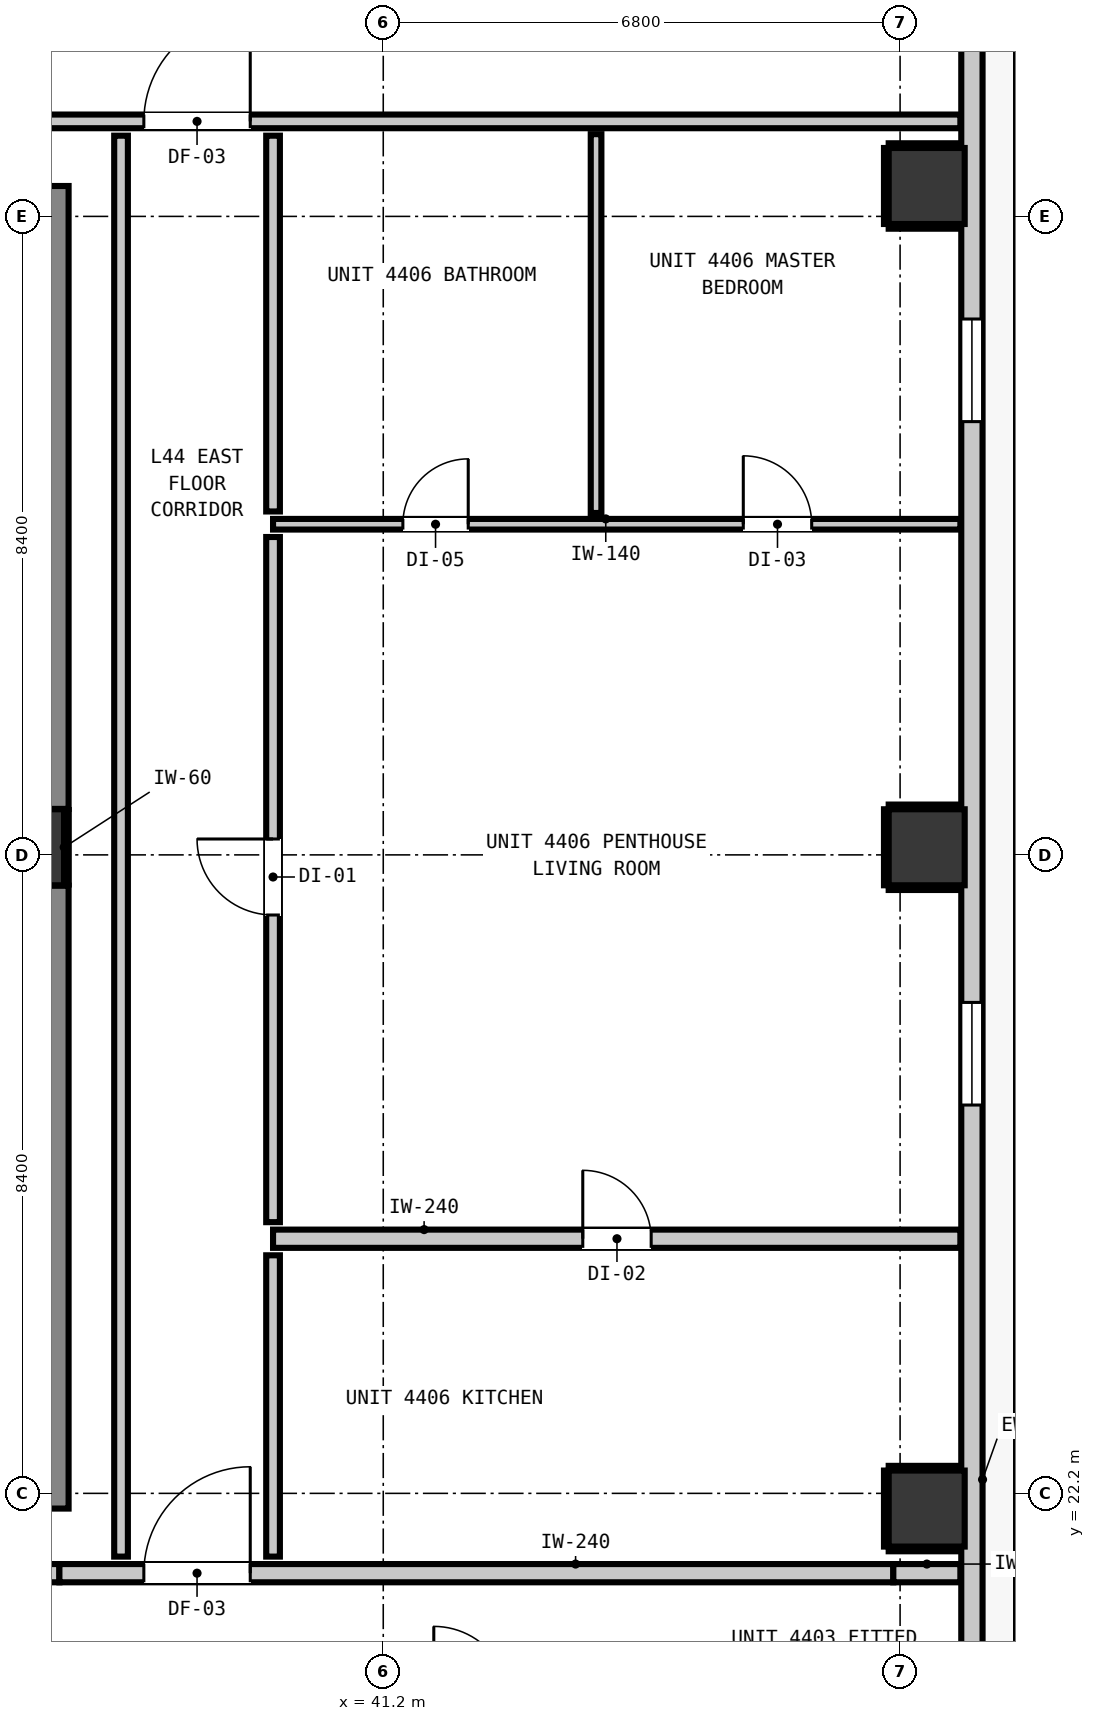
"""IFC4 building model, lengths in metres.
Left out: names, types, materials, properties, quantities, classifications, styles, units other than length and angle.
Written with IfcOpenShell. Run it as: python <this file> out.ifc"""

import sys

from ifc_helpers import new_model, si_unit, direction, frame, frame_2d, origin, origin_2d, place, context, subcontext, project, spatial, rectangle, extrude, element, fill, save


model = new_model("IFC4")
c1 = context("Model", 3, precision=1e-05, world=origin(), true_north=direction((0.0, 1.0)))
c2 = subcontext(c1, "Body", "Model", "MODEL_VIEW")
j1 = project(units=[si_unit("LENGTHUNIT", "METRE"), si_unit("PLANEANGLEUNIT", "RADIAN")], contexts=[c1])
p1 = place(None, origin())
s1 = spatial("IfcSite", under=j1, at=p1, CompositionType="ELEMENT")
p2 = place(p1, origin())
s2 = spatial("IfcBuilding", under=s1, at=p2, CompositionType="ELEMENT")
p3 = place(p2, frame((0.0, 0.0, 152.56)))
s3 = spatial("IfcBuildingStorey", under=s2, at=p3, CompositionType="ELEMENT", Elevation=152.56)
p4 = place(p3, frame((36.5, 30.7, 0.0), z_axis=(0.0, 0.0, 1.0), x_axis=(1.0, 0.0, 0.0)))
e1 = element("IfcColumn", 1, at=p4, inside=s3, PredefinedType="COLUMN", context=c2, shape_type="SweptSolid", body=[
    extrude(rectangle(XDim=1.0, YDim=1.0, at=origin_2d()), origin(), (0.0, 0.0, 1.0), 3.32),
])
p5 = place(p3, frame((36.56, 22.0, 0.0), z_axis=(0.0, 0.0, 1.0), x_axis=(0.0, 1.0, 0.0)))
e2 = element("IfcWall", 2, at=p5, inside=s3, PredefinedType="SHEAR", context=c2, shape_type="SweptSolid", body=[
    extrude(rectangle(XDim=8.195, YDim=1.0, at=frame_2d((4.098, 0.0))), origin(), (0.0, 0.0, 1.0), 3.32),
])
p6 = place(p3, frame((36.56, 31.205, 0.0), z_axis=(0.0, 0.0, 1.0), x_axis=(0.0, 1.0, 0.0)))
e3 = element("IfcWall", 3, at=p6, inside=s3, PredefinedType="SHEAR", context=c2, shape_type="SweptSolid", body=[
    extrude(rectangle(XDim=8.195, YDim=1.0, at=frame_2d((4.097, 0.0))), origin(), (0.0, 0.0, 1.0), 3.32),
])
for number, where, z_axis, x_axis in (
    (4, (48.35, 22.0, 0.0), (0.0, 0.0, 1.0), (1.0, 0.0, 0.0)),
    (5, (48.35, 30.7, 0.0), (0.0, 0.0, 1.0), (1.0, 0.0, 0.0)),
    (6, (48.35, 39.4, 0.0), (0.0, 0.0, 1.0), (1.0, 0.0, 0.0)),
):
    element("IfcColumn", number, at=place(p3, frame(where, z_axis=z_axis, x_axis=x_axis)), inside=s3, PredefinedType="COLUMN", context=c2, shape_type="SweptSolid", body=[
        extrude(rectangle(XDim=1.0, YDim=1.0, at=origin_2d()), origin(), (0.0, 0.0, 1.0), 3.32),
    ])
p7 = place(p3, frame((48.945, 49.845, 0.0), z_axis=(0.0, 0.0, 1.0), x_axis=(0.0, -1.0, 0.0)))
e7 = element("IfcWall", 7, at=p7, inside=s3, PredefinedType="STANDARD", context=c2, shape_type="SweptSolid", body=[
    extrude(rectangle(XDim=32.29, YDim=0.28, at=frame_2d((16.145, 0.0))), origin(), (0.0, 0.0, 1.0), 3.08),
])
p8 = place(p7, frame((0.904, 0.0, 0.0)))
e8 = element("IfcOpeningElement", 8, at=p8, cuts=e7, PredefinedType="OPENING", context=c2, shape_type="SweptSolid", body=[
    extrude(rectangle(XDim=1.0, YDim=2.15, at=frame_2d((0.5, 1.075))), frame((0.0, 0.15, 0.0), z_axis=(0.0, -1.0, 0.0), x_axis=(1.0, 0.0, 0.0)), (0.0, 0.0, 1.0), 0.3),
])
p9 = place(p7, frame((2.924, 0.0, 0.85)))
e9 = element("IfcOpeningElement", 9, at=p9, cuts=e7, PredefinedType="OPENING", context=c2, shape_type="SweptSolid", body=[
    extrude(rectangle(XDim=1.35, YDim=1.85, at=frame_2d((0.675, 0.925))), frame((0.0, 0.15, 0.0), z_axis=(0.0, -1.0, 0.0), x_axis=(1.0, 0.0, 0.0)), (0.0, 0.0, 1.0), 0.3),
])
p10 = place(p7, frame((21.186, 0.0, 0.85)))
e10 = element("IfcOpeningElement", 10, at=p10, cuts=e7, PredefinedType="OPENING", context=c2, shape_type="SweptSolid", body=[
    extrude(rectangle(XDim=1.35, YDim=1.85, at=frame_2d((0.675, 0.925))), frame((0.0, 0.15, 0.0), z_axis=(0.0, -1.0, 0.0), x_axis=(1.0, 0.0, 0.0)), (0.0, 0.0, 1.0), 0.3),
])
p11 = place(p7, frame((12.195, 0.0, 0.85)))
e11 = element("IfcOpeningElement", 11, at=p11, cuts=e7, PredefinedType="OPENING", context=c2, shape_type="SweptSolid", body=[
    extrude(rectangle(XDim=1.35, YDim=1.85, at=frame_2d((0.675, 0.925))), frame((0.0, 0.15, 0.0), z_axis=(0.0, -1.0, 0.0), x_axis=(1.0, 0.0, 0.0)), (0.0, 0.0, 1.0), 0.3),
])
p12 = place(p3, frame((9.407, 21.15, 0.0), z_axis=(0.0, 0.0, 1.0), x_axis=(1.0, 0.0, 0.0)))
e12 = element("IfcWall", 12, at=p12, inside=s3, PredefinedType="PARTITIONING", context=c2, shape_type="SweptSolid", body=[
    extrude(rectangle(XDim=27.532, YDim=0.24, at=frame_2d((13.766, 0.0))), origin(), (0.0, 0.0, 1.0), 3.08),
])
p13 = place(p12, frame((8.803, 0.0, 0.0)))
e13 = element("IfcOpeningElement", 13, at=p13, cuts=e12, PredefinedType="OPENING", context=c2, shape_type="SweptSolid", body=[
    extrude(rectangle(XDim=1.1, YDim=2.15, at=frame_2d((0.55, 1.075))), frame((0.0, 0.13, 0.0), z_axis=(0.0, -1.0, 0.0), x_axis=(1.0, 0.0, 0.0)), (0.0, 0.0, 1.0), 0.26),
])
p14 = place(p12, frame((1.192, 0.0, 0.0)))
e14 = element("IfcOpeningElement", 14, at=p14, cuts=e12, PredefinedType="OPENING", context=c2, shape_type="SweptSolid", body=[
    extrude(rectangle(XDim=1.4, YDim=2.15, at=frame_2d((0.7, 1.075))), frame((0.0, 0.13, 0.0), z_axis=(0.0, -1.0, 0.0), x_axis=(1.0, 0.0, 0.0)), (0.0, 0.0, 1.0), 0.26),
])
p15 = place(p3, frame((36.939, 21.15, 0.0), z_axis=(0.0, 0.0, 1.0), x_axis=(1.0, 0.0, 0.0)))
e15 = element("IfcWall", 15, at=p15, inside=s3, PredefinedType="PARTITIONING", context=c2, shape_type="SweptSolid", body=[
    extrude(rectangle(XDim=10.972, YDim=0.24, at=frame_2d((5.486, 0.0))), origin(), (0.0, 0.0, 1.0), 2.565),
])
p16 = place(p15, frame((1.111, 0.0, 0.0)))
e16 = element("IfcOpeningElement", 16, at=p16, cuts=e15, PredefinedType="OPENING", context=c2, shape_type="SweptSolid", body=[
    extrude(rectangle(XDim=1.4, YDim=2.15, at=frame_2d((0.7, 1.075))), frame((0.0, 0.13, 0.0), z_axis=(0.0, -1.0, 0.0), x_axis=(1.0, 0.0, 0.0)), (0.0, 0.0, 1.0), 0.26),
])
p17 = place(p3, frame((47.911, 21.15, 0.0), z_axis=(0.0, 0.0, 1.0), x_axis=(1.0, 0.0, 0.0)))
e17 = element("IfcWall", 17, at=p17, inside=s3, PredefinedType="PARTITIONING", context=c2, shape_type="SweptSolid", body=[
    extrude(rectangle(XDim=0.882, YDim=0.24, at=frame_2d((0.441, 0.0))), origin(), (0.0, 0.0, 1.0), 3.08),
])
p18 = place(p3, frame((39.75, 25.55, 0.0), z_axis=(0.0, 0.0, 1.0), x_axis=(1.0, 0.0, 0.0)))
e18 = element("IfcWall", 18, at=p18, inside=s3, PredefinedType="PARTITIONING", context=c2, shape_type="SweptSolid", body=[
    extrude(rectangle(XDim=9.043, YDim=0.24, at=frame_2d((4.521, 0.0))), origin(), (0.0, 0.0, 1.0), 3.08),
])
p19 = place(p18, frame((4.075, 0.0, 0.0)))
e19 = element("IfcOpeningElement", 19, at=p19, cuts=e18, PredefinedType="OPENING", context=c2, shape_type="SweptSolid", body=[
    extrude(rectangle(XDim=0.9, YDim=2.1, at=frame_2d((0.45, 1.05))), frame((0.0, 0.13, 0.0), z_axis=(0.0, -1.0, 0.0), x_axis=(1.0, 0.0, 0.0)), (0.0, 0.0, 1.0), 0.26),
])
p20 = place(p3, frame((9.407, 40.25, 0.0), z_axis=(0.0, 0.0, 1.0), x_axis=(1.0, 0.0, 0.0)))
e20 = element("IfcWall", 20, at=p20, inside=s3, PredefinedType="PARTITIONING", context=c2, shape_type="SweptSolid", body=[
    extrude(rectangle(XDim=39.386, YDim=0.18, at=frame_2d((19.693, 0.0))), origin(), (0.0, 0.0, 1.0), 3.08),
])
p21 = place(p20, frame((8.028, 0.0, 0.0)))
e21 = element("IfcOpeningElement", 21, at=p21, cuts=e20, PredefinedType="OPENING", context=c2, shape_type="SweptSolid", body=[
    extrude(rectangle(XDim=1.4, YDim=2.15, at=frame_2d((0.7, 1.075))), frame((0.0, 0.1, 0.0), z_axis=(0.0, -1.0, 0.0), x_axis=(1.0, 0.0, 0.0)), (0.0, 0.0, 1.0), 0.2),
])
p22 = place(p20, frame((1.192, 0.0, 0.0)))
e22 = element("IfcOpeningElement", 22, at=p22, cuts=e20, PredefinedType="OPENING", context=c2, shape_type="SweptSolid", body=[
    extrude(rectangle(XDim=1.4, YDim=2.15, at=frame_2d((0.7, 1.075))), frame((0.0, 0.1, 0.0), z_axis=(0.0, -1.0, 0.0), x_axis=(1.0, 0.0, 0.0)), (0.0, 0.0, 1.0), 0.2),
])
p23 = place(p20, frame((28.643, 0.0, 0.0)))
e23 = element("IfcOpeningElement", 23, at=p23, cuts=e20, PredefinedType="OPENING", context=c2, shape_type="SweptSolid", body=[
    extrude(rectangle(XDim=1.4, YDim=2.15, at=frame_2d((0.7, 1.075))), frame((0.0, 0.1, 0.0), z_axis=(0.0, -1.0, 0.0), x_axis=(1.0, 0.0, 0.0)), (0.0, 0.0, 1.0), 0.2),
])
p24 = place(p3, frame((39.75, 34.95, 0.0), z_axis=(0.0, 0.0, 1.0), x_axis=(1.0, 0.0, 0.0)))
e24 = element("IfcWall", 24, at=p24, inside=s3, PredefinedType="PARTITIONING", context=c2, shape_type="SweptSolid", body=[
    extrude(rectangle(XDim=9.043, YDim=0.14, at=frame_2d((4.521, 0.0))), origin(), (0.0, 0.0, 1.0), 3.08),
])
p25 = place(p24, frame((1.708, 0.0, 0.0)))
e25 = element("IfcOpeningElement", 25, at=p25, cuts=e24, PredefinedType="OPENING", context=c2, shape_type="SweptSolid", body=[
    extrude(rectangle(XDim=0.86, YDim=2.02, at=frame_2d((0.43, 1.01))), frame((0.0, 0.08, 0.0), z_axis=(0.0, -1.0, 0.0), x_axis=(1.0, 0.0, 0.0)), (0.0, 0.0, 1.0), 0.16),
])
p26 = place(p24, frame((6.187, 0.0, 0.0)))
e26 = element("IfcOpeningElement", 26, at=p26, cuts=e24, PredefinedType="OPENING", context=c2, shape_type="SweptSolid", body=[
    extrude(rectangle(XDim=0.9, YDim=2.1, at=frame_2d((0.45, 1.05))), frame((0.0, 0.08, 0.0), z_axis=(0.0, -1.0, 0.0), x_axis=(1.0, 0.0, 0.0)), (0.0, 0.0, 1.0), 0.16),
])
p27 = place(p3, frame((37.75, 21.368, 0.0), z_axis=(0.0, 0.0, 1.0), x_axis=(0.0, 1.0, 0.0)))
e27 = element("IfcWall", 27, at=p27, inside=s3, PredefinedType="PARTITIONING", context=c2, shape_type="SweptSolid", body=[
    extrude(rectangle(XDim=18.694, YDim=0.18, at=frame_2d((9.347, 0.0))), origin(), (0.0, 0.0, 1.0), 3.08),
])
p28 = place(p3, frame((39.75, 21.368, 0.0), z_axis=(0.0, 0.0, 1.0), x_axis=(0.0, 1.0, 0.0)))
e28 = element("IfcWall", 28, at=p28, inside=s3, PredefinedType="PARTITIONING", context=c2, shape_type="SweptSolid", body=[
    extrude(rectangle(XDim=3.964, YDim=0.18, at=frame_2d((1.982, 0.0))), origin(), (0.0, 0.0, 1.0), 3.08),
])
p29 = place(p3, frame((39.75, 25.768, 0.0), z_axis=(0.0, 0.0, 1.0), x_axis=(0.0, 1.0, 0.0)))
e29 = element("IfcWall", 29, at=p29, inside=s3, PredefinedType="PARTITIONING", context=c2, shape_type="SweptSolid", body=[
    extrude(rectangle(XDim=9.014, YDim=0.18, at=frame_2d((4.507, 0.0))), origin(), (0.0, 0.0, 1.0), 3.08),
])
p30 = place(p29, frame((4.041, 0.0, 0.0)))
e30 = element("IfcOpeningElement", 30, at=p30, cuts=e29, PredefinedType="OPENING", context=c2, shape_type="SweptSolid", body=[
    extrude(rectangle(XDim=1.0, YDim=2.15, at=frame_2d((0.5, 1.075))), frame((0.0, 0.1, 0.0), z_axis=(0.0, -1.0, 0.0), x_axis=(1.0, 0.0, 0.0)), (0.0, 0.0, 1.0), 0.2),
])
p31 = place(p3, frame((39.75, 35.118, 0.0), z_axis=(0.0, 0.0, 1.0), x_axis=(0.0, 1.0, 0.0)))
e31 = element("IfcWall", 31, at=p31, inside=s3, PredefinedType="PARTITIONING", context=c2, shape_type="SweptSolid", body=[
    extrude(rectangle(XDim=4.944, YDim=0.18, at=frame_2d((2.472, 0.0))), origin(), (0.0, 0.0, 1.0), 3.08),
])
p32 = place(p3, frame((44.0, 35.098, 0.0), z_axis=(0.0, 0.0, 1.0), x_axis=(0.0, 1.0, 0.0)))
e32 = element("IfcWall", 32, at=p32, inside=s3, PredefinedType="PARTITIONING", context=c2, shape_type="SweptSolid", body=[
    extrude(rectangle(XDim=4.984, YDim=0.14, at=frame_2d((2.492, 0.0))), origin(), (0.0, 0.0, 1.0), 3.08),
])
p33 = place(p3, frame((37.032, 30.21, 0.0), z_axis=(0.0, 0.0, 1.0), x_axis=(0.0, 1.0, 0.0)))
e33 = element("IfcWall", 33, at=p33, inside=s3, PredefinedType="PARTITIONING", context=c2, shape_type="SweptSolid", body=[
    extrude(rectangle(XDim=0.98, YDim=0.06, at=frame_2d((0.49, 0.0))), origin(), (0.0, 0.0, 1.0), 1.45),
])
for number, where, z_axis, x_axis in (
    (34, (47.85, 21.468, 0.0), (0.0, 0.0, 1.0), (1.0, 0.0, 0.0)),
    (35, (47.85, 22.532, 0.0), (0.0, 0.0, 1.0), (1.0, 0.0, 0.0)),
):
    element("IfcWall", number, at=place(p3, frame(where, z_axis=z_axis, x_axis=x_axis)), inside=s3, PredefinedType="PARTITIONING", context=c2, shape_type="SweptSolid", body=[
        extrude(rectangle(XDim=0.94, YDim=0.06, at=frame_2d((0.47, 0.0))), origin(), (0.0, 0.0, 1.0), 1.45),
    ])
p34 = place(p3, frame((47.818, 21.5, 0.0), z_axis=(0.0, 0.0, 1.0), x_axis=(0.0, 1.0, 0.0)))
e36 = element("IfcWall", 36, at=p34, inside=s3, PredefinedType="PARTITIONING", context=c2, shape_type="SweptSolid", body=[
    extrude(rectangle(XDim=1.0, YDim=0.06, at=frame_2d((0.5, 0.0))), origin(), (0.0, 0.0, 1.0), 1.45),
])
for number, where, z_axis, x_axis in (
    (37, (47.85, 30.168, 0.0), (0.0, 0.0, 1.0), (1.0, 0.0, 0.0)),
    (38, (47.85, 31.232, 0.0), (0.0, 0.0, 1.0), (1.0, 0.0, 0.0)),
):
    element("IfcWall", number, at=place(p3, frame(where, z_axis=z_axis, x_axis=x_axis)), inside=s3, PredefinedType="PARTITIONING", context=c2, shape_type="SweptSolid", body=[
        extrude(rectangle(XDim=0.94, YDim=0.06, at=frame_2d((0.47, 0.0))), origin(), (0.0, 0.0, 1.0), 1.45),
    ])
p35 = place(p3, frame((47.818, 30.2, 0.0), z_axis=(0.0, 0.0, 1.0), x_axis=(0.0, 1.0, 0.0)))
e39 = element("IfcWall", 39, at=p35, inside=s3, PredefinedType="PARTITIONING", context=c2, shape_type="SweptSolid", body=[
    extrude(rectangle(XDim=1.0, YDim=0.06, at=frame_2d((0.5, 0.0))), origin(), (0.0, 0.0, 1.0), 1.45),
])
for number, where, z_axis, x_axis in (
    (40, (47.85, 38.868, 0.0), (0.0, 0.0, 1.0), (1.0, 0.0, 0.0)),
    (41, (47.85, 39.932, 0.0), (0.0, 0.0, 1.0), (1.0, 0.0, 0.0)),
):
    element("IfcWall", number, at=place(p3, frame(where, z_axis=z_axis, x_axis=x_axis)), inside=s3, PredefinedType="PARTITIONING", context=c2, shape_type="SweptSolid", body=[
        extrude(rectangle(XDim=0.94, YDim=0.06, at=frame_2d((0.47, 0.0))), origin(), (0.0, 0.0, 1.0), 1.45),
    ])
p36 = place(p3, frame((47.818, 38.9, 0.0), z_axis=(0.0, 0.0, 1.0), x_axis=(0.0, 1.0, 0.0)))
e42 = element("IfcWall", 42, at=p36, inside=s3, PredefinedType="PARTITIONING", context=c2, shape_type="SweptSolid", body=[
    extrude(rectangle(XDim=1.0, YDim=0.06, at=frame_2d((0.5, 0.0))), origin(), (0.0, 0.0, 1.0), 1.45),
])
p37 = place(p10, origin())
e43 = element("IfcWindow", 43, at=p37, inside=s3, PartitioningType="SINGLE_PANEL", PredefinedType="WINDOW", context=c2, shape_type="SweptSolid", body=[
    extrude(rectangle(XDim=1.35, YDim=1.85, at=frame_2d((0.675, 0.925))), frame((0.0, 0.03, 0.0), z_axis=(0.0, -1.0, 0.0), x_axis=(1.0, 0.0, 0.0)), (0.0, 0.0, 1.0), 0.06),
])
fill(e10, e43)
p38 = place(p11, origin())
e44 = element("IfcWindow", 44, at=p38, inside=s3, PartitioningType="SINGLE_PANEL", PredefinedType="WINDOW", context=c2, shape_type="SweptSolid", body=[
    extrude(rectangle(XDim=1.35, YDim=1.85, at=frame_2d((0.675, 0.925))), frame((0.0, 0.03, 0.0), z_axis=(0.0, -1.0, 0.0), x_axis=(1.0, 0.0, 0.0)), (0.0, 0.0, 1.0), 0.06),
])
fill(e11, e44)
p39 = place(p16, origin())
e45 = element("IfcDoor", 45, at=p39, inside=s3, OperationType="SINGLE_SWING_RIGHT", PredefinedType="DOOR", context=c2, shape_type="SweptSolid", body=[
    extrude(rectangle(XDim=1.4, YDim=2.15, at=frame_2d((0.7, 1.075))), frame((0.0, 0.025, 0.0), z_axis=(0.0, -1.0, 0.0), x_axis=(1.0, 0.0, 0.0)), (0.0, 0.0, 1.0), 0.05),
])
fill(e16, e45)
p40 = place(p23, origin())
e46 = element("IfcDoor", 46, at=p40, inside=s3, OperationType="SINGLE_SWING_RIGHT", PredefinedType="DOOR", context=c2, shape_type="SweptSolid", body=[
    extrude(rectangle(XDim=1.4, YDim=2.15, at=frame_2d((0.7, 1.075))), frame((0.0, 0.025, 0.0), z_axis=(0.0, -1.0, 0.0), x_axis=(1.0, 0.0, 0.0)), (0.0, 0.0, 1.0), 0.05),
])
fill(e23, e46)
p41 = place(p30, origin())
e47 = element("IfcDoor", 47, at=p41, inside=s3, OperationType="SINGLE_SWING_RIGHT", PredefinedType="DOOR", context=c2, shape_type="SweptSolid", body=[
    extrude(rectangle(XDim=1.0, YDim=2.15, at=frame_2d((0.5, 1.075))), frame((0.0, 0.025, 0.0), z_axis=(0.0, -1.0, 0.0), x_axis=(1.0, 0.0, 0.0)), (0.0, 0.0, 1.0), 0.05),
])
fill(e30, e47)
p42 = place(p19, origin())
e48 = element("IfcDoor", 48, at=p42, inside=s3, OperationType="SINGLE_SWING_LEFT", PredefinedType="DOOR", context=c2, shape_type="SweptSolid", body=[
    extrude(rectangle(XDim=0.9, YDim=2.1, at=frame_2d((0.45, 1.05))), frame((0.0, 0.025, 0.0), z_axis=(0.0, -1.0, 0.0), x_axis=(1.0, 0.0, 0.0)), (0.0, 0.0, 1.0), 0.05),
])
fill(e19, e48)
p43 = place(p25, origin())
e49 = element("IfcDoor", 49, at=p43, inside=s3, OperationType="SINGLE_SWING_RIGHT", PredefinedType="DOOR", context=c2, shape_type="SweptSolid", body=[
    extrude(rectangle(XDim=0.86, YDim=2.02, at=frame_2d((0.43, 1.01))), frame((0.0, 0.025, 0.0), z_axis=(0.0, -1.0, 0.0), x_axis=(1.0, 0.0, 0.0)), (0.0, 0.0, 1.0), 0.05),
])
fill(e25, e49)
p44 = place(p26, origin())
e50 = element("IfcDoor", 50, at=p44, inside=s3, OperationType="SINGLE_SWING_LEFT", PredefinedType="DOOR", context=c2, shape_type="SweptSolid", body=[
    extrude(rectangle(XDim=0.9, YDim=2.1, at=frame_2d((0.45, 1.05))), frame((0.0, 0.025, 0.0), z_axis=(0.0, -1.0, 0.0), x_axis=(1.0, 0.0, 0.0)), (0.0, 0.0, 1.0), 0.05),
])
fill(e26, e50)
save(model, sys.argv[1])
